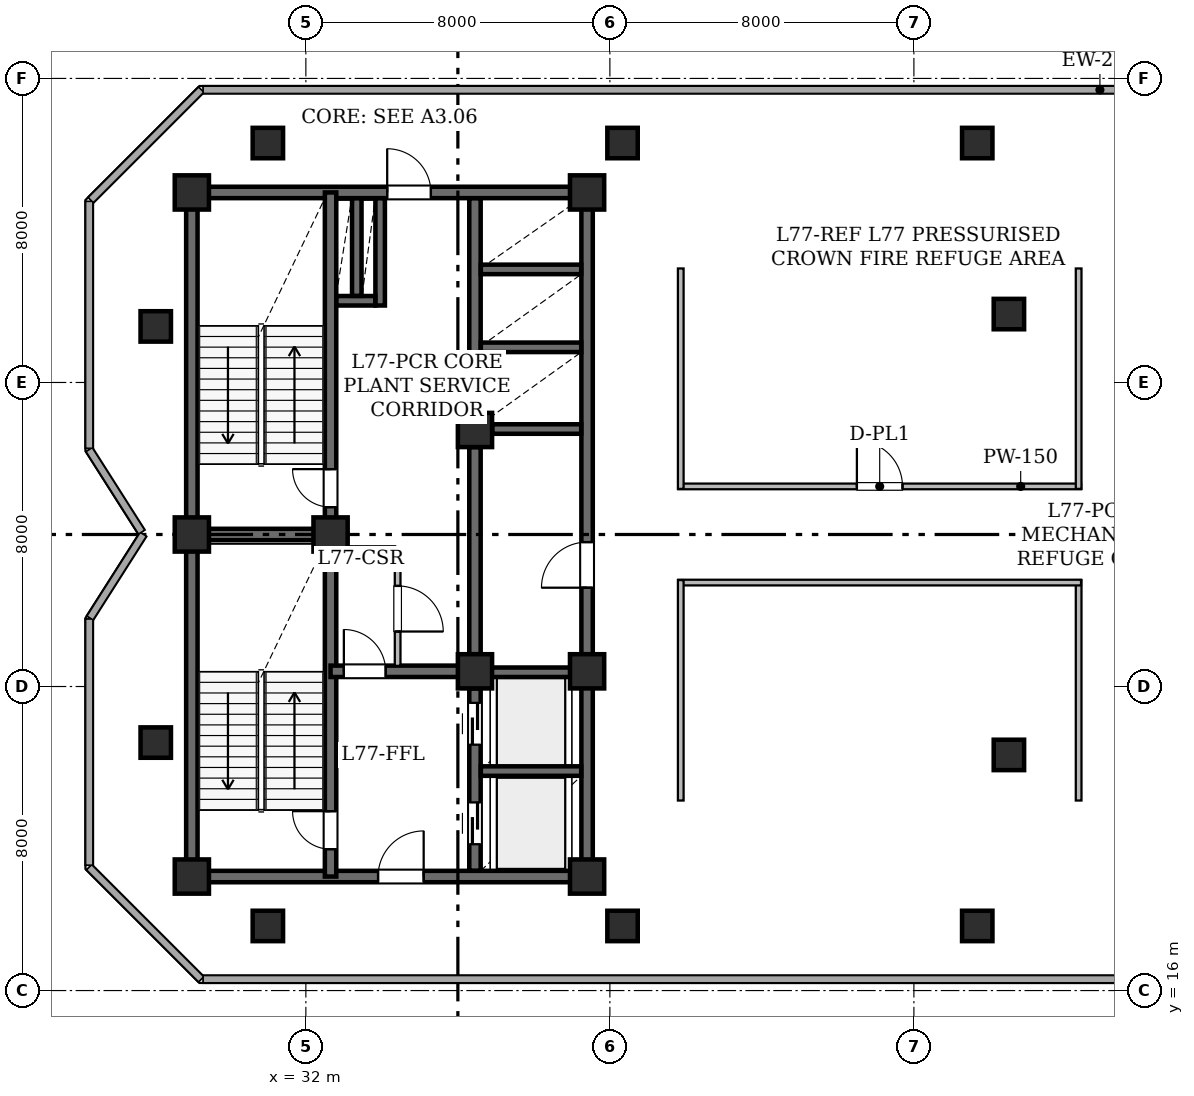
"""IFC4 building model, lengths in metres.
Left out: names, types, materials, properties, quantities, classifications, styles, units other than length and angle.
Written with IfcOpenShell. Run it as: python <this file> out.ifc"""

import sys

from ifc_helpers import new_model, si_unit, direction, frame, frame_2d, origin, origin_2d, place, context, subcontext, project, spatial, rectangle, hollow_rectangle, extrude, element, fill, save


model = new_model("IFC4")
c1 = context("Model", 3, precision=1e-05, world=origin(), true_north=direction((0.0, 1.0)))
c2 = subcontext(c1, "Body", "Model", "MODEL_VIEW")
j1 = project(units=[si_unit("LENGTHUNIT", "METRE"), si_unit("PLANEANGLEUNIT", "RADIAN")], contexts=[c1])
p1 = place(None, origin())
s1 = spatial("IfcSite", under=j1, at=p1, CompositionType="ELEMENT")
p2 = place(p1, origin())
s2 = spatial("IfcBuilding", under=s1, at=p2, CompositionType="ELEMENT")
p3 = place(p2, frame((0.0, 0.0, 303.05)))
s3 = spatial("IfcBuildingStorey", under=s2, at=p3, CompositionType="ELEMENT", Elevation=303.05)
for number, where, z_axis, x_axis in (
    (1, (29.0, 19.0, 0.0), (0.0, 0.0, 1.0), (1.0, 0.0, 0.0)),
    (2, (32.65, 28.0, 0.0), (0.0, 0.0, 1.0), (1.0, 0.0, 0.0)),
    (3, (39.4, 19.0, 0.0), (0.0, 0.0, 1.0), (1.0, 0.0, 0.0)),
    (4, (29.0, 28.0, 0.0), (0.0, 0.0, 1.0), (1.0, 0.0, 0.0)),
    (5, (36.45, 24.4, 0.0), (0.0, 0.0, 1.0), (1.0, 0.0, 0.0)),
    (6, (39.4, 24.4, 0.0), (0.0, 0.0, 1.0), (1.0, 0.0, 0.0)),
    (7, (29.0, 37.0, 0.0), (0.0, 0.0, 1.0), (1.0, 0.0, 0.0)),
    (8, (36.45, 30.75, 0.0), (0.0, 0.0, 1.0), (1.0, 0.0, 0.0)),
    (9, (39.4, 37.0, 0.0), (0.0, 0.0, 1.0), (1.0, 0.0, 0.0)),
):
    element("IfcColumn", number, at=place(p3, frame(where, z_axis=z_axis, x_axis=x_axis)), inside=s3, PredefinedType="COLUMN", context=c2, shape_type="SweptSolid", body=[
        extrude(hollow_rectangle(XDim=0.9, YDim=0.9, WallThickness=0.045, at=origin_2d()), origin(), (0.0, 0.0, 1.0), 4.8),
    ])
for number, where, z_axis, x_axis in (
    (10, (31.0, 17.7, 0.0), (0.0, 0.0, 1.0), (1.0, 0.0, 0.0)),
    (11, (40.333, 17.7, 0.0), (0.0, 0.0, 1.0), (1.0, 0.0, 0.0)),
    (12, (49.667, 17.7, 0.0), (0.0, 0.0, 1.0), (1.0, 0.0, 0.0)),
    (13, (31.0, 38.3, 0.0), (0.0, 0.0, 1.0), (1.0, 0.0, 0.0)),
    (14, (40.333, 38.3, 0.0), (0.0, 0.0, 1.0), (1.0, 0.0, 0.0)),
    (15, (49.667, 38.3, 0.0), (0.0, 0.0, 1.0), (1.0, 0.0, 0.0)),
    (16, (28.05, 22.525, 0.0), (0.0, 0.0, 1.0), (1.0, 0.0, 0.0)),
    (17, (28.05, 33.475, 0.0), (0.0, 0.0, 1.0), (1.0, 0.0, 0.0)),
    (18, (50.5, 22.2, 0.0), (0.0, 0.0, 1.0), (1.0, 0.0, 0.0)),
    (19, (50.5, 33.8, 0.0), (0.0, 0.0, 1.0), (1.0, 0.0, 0.0)),
):
    element("IfcColumn", number, at=place(p3, frame(where, z_axis=z_axis, x_axis=x_axis)), inside=s3, PredefinedType="COLUMN", context=c2, shape_type="SweptSolid", body=[
        extrude(hollow_rectangle(XDim=0.8, YDim=0.8, WallThickness=0.04, at=origin_2d()), origin(), (0.0, 0.0, 1.0), 4.8),
    ])
p4 = place(p3, frame((29.241, 16.3, 0.0), z_axis=(0.0, 0.0, 1.0), x_axis=(-0.707106781187, 0.707106781187, 0.0)))
e20 = element("IfcWall", 20, at=p4, inside=s3, PredefinedType="STANDARD", context=c2, shape_type="SweptSolid", body=[
    extrude(rectangle(XDim=4.159, YDim=0.2, at=frame_2d((2.08, 0.0))), origin(), (0.0, 0.0, 1.0), 1.15),
])
p5 = place(p3, frame((26.3, 19.304, 0.0), z_axis=(0.0, 0.0, 1.0), x_axis=(0.0, 1.0, 0.0)))
e21 = element("IfcWall", 21, at=p5, inside=s3, PredefinedType="STANDARD", context=c2, shape_type="SweptSolid", body=[
    extrude(rectangle(XDim=6.467, YDim=0.2, at=frame_2d((3.233, 0.0))), origin(), (0.0, 0.0, 1.0), 1.15),
])
p6 = place(p3, frame((26.323, 25.808, 0.0), z_axis=(0.0, 0.0, 1.0), x_axis=(0.53719156007, 0.843460270428, 0.0)))
e22 = element("IfcWall", 22, at=p6, inside=s3, PredefinedType="STANDARD", context=c2, shape_type="SweptSolid", body=[
    extrude(rectangle(XDim=2.599, YDim=0.2, at=frame_2d((1.299, 0.0))), origin(), (0.0, 0.0, 1.0), 1.15),
])
p7 = place(p3, frame((27.675, 28.068, 0.0), z_axis=(0.0, 0.0, 1.0), x_axis=(-0.536844652872, 0.843681111963, 0.0)))
e23 = element("IfcWall", 23, at=p7, inside=s3, PredefinedType="STANDARD", context=c2, shape_type="SweptSolid", body=[
    extrude(rectangle(XDim=2.561, YDim=0.2, at=frame_2d((1.281, 0.0))), origin(), (0.0, 0.0, 1.0), 1.15),
])
p8 = place(p3, frame((26.3, 30.274, 0.0), z_axis=(0.0, 0.0, 1.0), x_axis=(0.0, 1.0, 0.0)))
e24 = element("IfcWall", 24, at=p8, inside=s3, PredefinedType="STANDARD", context=c2, shape_type="SweptSolid", body=[
    extrude(rectangle(XDim=6.485, YDim=0.2, at=frame_2d((3.243, 0.0))), origin(), (0.0, 0.0, 1.0), 1.15),
])
p9 = place(p3, frame((26.344, 36.803, 0.0), z_axis=(0.0, 0.0, 1.0), x_axis=(0.707106781187, 0.707106781187, 0.0)))
e25 = element("IfcWall", 25, at=p9, inside=s3, PredefinedType="STANDARD", context=c2, shape_type="SweptSolid", body=[
    extrude(rectangle(XDim=4.097, YDim=0.2, at=frame_2d((2.048, 0.0))), origin(), (0.0, 0.0, 1.0), 1.15),
])
p10 = place(p3, frame((29.302, 39.7, 0.0), z_axis=(0.0, 0.0, 1.0), x_axis=(1.0, 0.0, 0.0)))
e26 = element("IfcWall", 26, at=p10, inside=s3, PredefinedType="STANDARD", context=c2, shape_type="SweptSolid", body=[
    extrude(rectangle(XDim=31.457, YDim=0.2, at=frame_2d((15.729, 0.0))), origin(), (0.0, 0.0, 1.0), 1.15),
])
p11 = place(p3, frame((60.696, 16.3, 0.0), z_axis=(0.0, 0.0, 1.0), x_axis=(-1.0, 0.0, 0.0)))
e27 = element("IfcWall", 27, at=p11, inside=s3, PredefinedType="STANDARD", context=c2, shape_type="SweptSolid", body=[
    extrude(rectangle(XDim=31.393, YDim=0.2, at=frame_2d((15.697, 0.0))), origin(), (0.0, 0.0, 1.0), 1.15),
])
for number, where, z_axis, x_axis in (
    (28, (29.0, 19.0, 0.0), (0.0, 0.0, 1.0), (0.0, 1.0, 0.0)),
    (29, (29.0, 28.0, 0.0), (0.0, 0.0, 1.0), (0.0, 1.0, 0.0)),
):
    element("IfcWall", number, at=place(p3, frame(where, z_axis=z_axis, x_axis=x_axis)), inside=s3, PredefinedType="SHEAR", context=c2, shape_type="SweptSolid", body=[
        extrude(rectangle(XDim=9.0, YDim=0.3, at=frame_2d((4.5, 0.0))), origin(), (0.0, 0.0, 1.0), 4.55),
    ])
p12 = place(p3, frame((29.0, 19.0, 0.0), z_axis=(0.0, 0.0, 1.0), x_axis=(1.0, 0.0, 0.0)))
e30 = element("IfcWall", 30, at=p12, inside=s3, PredefinedType="SHEAR", context=c2, shape_type="SweptSolid", body=[
    extrude(rectangle(XDim=10.4, YDim=0.3, at=frame_2d((5.2, 0.0))), origin(), (0.0, 0.0, 1.0), 4.55),
])
p13 = place(p12, frame((4.9, 0.0, 0.0)))
e31 = element("IfcOpeningElement", 31, at=p13, cuts=e30, PredefinedType="OPENING", context=c2, shape_type="SweptSolid", body=[
    extrude(rectangle(XDim=1.2, YDim=2.15, at=frame_2d((0.6, 1.075))), frame((0.0, 0.16, 0.0), z_axis=(0.0, -1.0, 0.0), x_axis=(1.0, 0.0, 0.0)), (0.0, 0.0, 1.0), 0.32),
])
p14 = place(p3, frame((29.0, 37.0, 0.0), z_axis=(0.0, 0.0, 1.0), x_axis=(1.0, 0.0, 0.0)))
e32 = element("IfcWall", 32, at=p14, inside=s3, PredefinedType="SHEAR", context=c2, shape_type="SweptSolid", body=[
    extrude(rectangle(XDim=10.4, YDim=0.3, at=frame_2d((5.2, 0.0))), origin(), (0.0, 0.0, 1.0), 4.55),
])
p15 = place(p14, frame((5.14, 0.0, 0.0)))
e33 = element("IfcOpeningElement", 33, at=p15, cuts=e32, PredefinedType="OPENING", context=c2, shape_type="SweptSolid", body=[
    extrude(rectangle(XDim=1.15, YDim=2.2, at=frame_2d((0.575, 1.1))), frame((0.0, 0.16, 0.0), z_axis=(0.0, -1.0, 0.0), x_axis=(1.0, 0.0, 0.0)), (0.0, 0.0, 1.0), 0.32),
])
p16 = place(p3, frame((39.4, 19.0, 0.0), z_axis=(0.0, 0.0, 1.0), x_axis=(0.0, 1.0, 0.0)))
e34 = element("IfcWall", 34, at=p16, inside=s3, PredefinedType="SHEAR", context=c2, shape_type="SweptSolid", body=[
    extrude(rectangle(XDim=5.4, YDim=0.3, at=frame_2d((2.7, 0.0))), origin(), (0.0, 0.0, 1.0), 4.55),
])
p17 = place(p3, frame((39.4, 24.4, 0.0), z_axis=(0.0, 0.0, 1.0), x_axis=(0.0, 1.0, 0.0)))
e35 = element("IfcWall", 35, at=p17, inside=s3, PredefinedType="SHEAR", context=c2, shape_type="SweptSolid", body=[
    extrude(rectangle(XDim=12.6, YDim=0.3, at=frame_2d((6.3, 0.0))), origin(), (0.0, 0.0, 1.0), 4.55),
])
p18 = place(p17, frame((2.2, 0.0, 0.0)))
e36 = element("IfcOpeningElement", 36, at=p18, cuts=e35, PredefinedType="OPENING", context=c2, shape_type="SweptSolid", body=[
    extrude(rectangle(XDim=1.2, YDim=2.15, at=frame_2d((0.6, 1.075))), frame((0.0, 0.16, 0.0), z_axis=(0.0, -1.0, 0.0), x_axis=(1.0, 0.0, 0.0)), (0.0, 0.0, 1.0), 0.32),
])
p19 = place(p3, frame((32.65, 19.0, 0.0), z_axis=(0.0, 0.0, 1.0), x_axis=(0.0, 1.0, 0.0)))
e37 = element("IfcWall", 37, at=p19, inside=s3, PredefinedType="SHEAR", context=c2, shape_type="SweptSolid", body=[
    extrude(rectangle(XDim=9.0, YDim=0.3, at=frame_2d((4.5, 0.0))), origin(), (0.0, 0.0, 1.0), 4.55),
])
p20 = place(p19, frame((0.72, 0.0, 0.0)))
e38 = element("IfcOpeningElement", 38, at=p20, cuts=e37, PredefinedType="OPENING", context=c2, shape_type="SweptSolid", body=[
    extrude(rectangle(XDim=1.0, YDim=2.15, at=frame_2d((0.5, 1.075))), frame((0.0, 0.16, 0.0), z_axis=(0.0, -1.0, 0.0), x_axis=(1.0, 0.0, 0.0)), (0.0, 0.0, 1.0), 0.32),
])
p21 = place(p3, frame((32.65, 28.0, 0.0), z_axis=(0.0, 0.0, 1.0), x_axis=(0.0, 1.0, 0.0)))
e39 = element("IfcWall", 39, at=p21, inside=s3, PredefinedType="SHEAR", context=c2, shape_type="SweptSolid", body=[
    extrude(rectangle(XDim=9.0, YDim=0.3, at=frame_2d((4.5, 0.0))), origin(), (0.0, 0.0, 1.0), 4.55),
])
p22 = place(p21, frame((0.72, 0.0, 0.0)))
e40 = element("IfcOpeningElement", 40, at=p22, cuts=e39, PredefinedType="OPENING", context=c2, shape_type="SweptSolid", body=[
    extrude(rectangle(XDim=1.0, YDim=2.15, at=frame_2d((0.5, 1.075))), frame((0.0, 0.16, 0.0), z_axis=(0.0, -1.0, 0.0), x_axis=(1.0, 0.0, 0.0)), (0.0, 0.0, 1.0), 0.32),
])
p23 = place(p3, frame((29.0, 28.0, 0.0), z_axis=(0.0, 0.0, 1.0), x_axis=(1.0, 0.0, 0.0)))
e41 = element("IfcWall", 41, at=p23, inside=s3, PredefinedType="SHEAR", context=c2, shape_type="SweptSolid", body=[
    extrude(rectangle(XDim=3.65, YDim=0.3, at=frame_2d((1.825, 0.0))), origin(), (0.0, 0.0, 1.0), 4.55),
])
p24 = place(p3, frame((32.65, 24.4, 0.0), z_axis=(0.0, 0.0, 1.0), x_axis=(1.0, 0.0, 0.0)))
e42 = element("IfcWall", 42, at=p24, inside=s3, PredefinedType="SHEAR", context=c2, shape_type="SweptSolid", body=[
    extrude(rectangle(XDim=3.8, YDim=0.3, at=frame_2d((1.9, 0.0))), origin(), (0.0, 0.0, 1.0), 4.55),
])
p25 = place(p24, frame((0.35, 0.0, 0.0)))
e43 = element("IfcOpeningElement", 43, at=p25, cuts=e42, PredefinedType="OPENING", context=c2, shape_type="SweptSolid", body=[
    extrude(rectangle(XDim=1.1, YDim=2.15, at=frame_2d((0.55, 1.075))), frame((0.0, 0.16, 0.0), z_axis=(0.0, -1.0, 0.0), x_axis=(1.0, 0.0, 0.0)), (0.0, 0.0, 1.0), 0.32),
])
p26 = place(p3, frame((36.45, 19.154, 0.0), z_axis=(0.0, 0.0, 1.0), x_axis=(0.0, 1.0, 0.0)))
e44 = element("IfcWall", 44, at=p26, inside=s3, PredefinedType="SHEAR", context=c2, shape_type="SweptSolid", body=[
    extrude(rectangle(XDim=4.796, YDim=0.3, at=frame_2d((2.398, 0.0))), origin(), (0.0, 0.0, 1.0), 4.55),
])
p27 = place(p26, frame((0.696, 0.0, 0.0)))
e45 = element("IfcOpeningElement", 45, at=p27, cuts=e44, PredefinedType="OPENING", context=c2, shape_type="SweptSolid", body=[
    extrude(rectangle(XDim=1.1, YDim=2.15, at=frame_2d((0.55, 1.075))), frame((0.0, 0.16, 0.0), z_axis=(0.0, -1.0, 0.0), x_axis=(1.0, 0.0, 0.0)), (0.0, 0.0, 1.0), 0.32),
])
p28 = place(p26, frame((3.316, 0.0, 0.0)))
e46 = element("IfcOpeningElement", 46, at=p28, cuts=e44, PredefinedType="OPENING", context=c2, shape_type="SweptSolid", body=[
    extrude(rectangle(XDim=1.1, YDim=2.15, at=frame_2d((0.55, 1.075))), frame((0.0, 0.16, 0.0), z_axis=(0.0, -1.0, 0.0), x_axis=(1.0, 0.0, 0.0)), (0.0, 0.0, 1.0), 0.32),
])
p29 = place(p3, frame((36.45, 24.85, 0.0), z_axis=(0.0, 0.0, 1.0), x_axis=(0.0, 1.0, 0.0)))
e47 = element("IfcWall", 47, at=p29, inside=s3, PredefinedType="SHEAR", context=c2, shape_type="SweptSolid", body=[
    extrude(rectangle(XDim=5.45, YDim=0.3, at=frame_2d((2.725, 0.0))), origin(), (0.0, 0.0, 1.0), 4.55),
])
p30 = place(p3, frame((36.45, 31.2, 0.0), z_axis=(0.0, 0.0, 1.0), x_axis=(0.0, 1.0, 0.0)))
e48 = element("IfcWall", 48, at=p30, inside=s3, PredefinedType="SHEAR", context=c2, shape_type="SweptSolid", body=[
    extrude(rectangle(XDim=5.646, YDim=0.3, at=frame_2d((2.823, 0.0))), origin(), (0.0, 0.0, 1.0), 4.55),
])
for number, where, z_axis, x_axis in (
    (49, (36.604, 21.775, 0.0), (0.0, 0.0, 1.0), (1.0, 0.0, 0.0)),
    (50, (36.604, 24.375, 0.0), (0.0, 0.0, 1.0), (1.0, 0.0, 0.0)),
):
    element("IfcWall", number, at=place(p3, frame(where, z_axis=z_axis, x_axis=x_axis)), inside=s3, PredefinedType="SHEAR", context=c2, shape_type="SweptSolid", body=[
        extrude(rectangle(XDim=2.642, YDim=0.25, at=frame_2d((1.321, 0.0))), origin(), (0.0, 0.0, 1.0), 4.55),
    ])
p31 = place(p3, frame((36.904, 30.775, 0.0), z_axis=(0.0, 0.0, 1.0), x_axis=(1.0, 0.0, 0.0)))
e51 = element("IfcWall", 51, at=p31, inside=s3, PredefinedType="SHEAR", context=c2, shape_type="SweptSolid", body=[
    extrude(rectangle(XDim=2.342, YDim=0.25, at=frame_2d((1.171, 0.0))), origin(), (0.0, 0.0, 1.0), 4.55),
])
for number, where, z_axis, x_axis in (
    (52, (36.604, 32.925, 0.0), (0.0, 0.0, 1.0), (1.0, 0.0, 0.0)),
    (53, (36.604, 34.975, 0.0), (0.0, 0.0, 1.0), (1.0, 0.0, 0.0)),
):
    element("IfcWall", number, at=place(p3, frame(where, z_axis=z_axis, x_axis=x_axis)), inside=s3, PredefinedType="SHEAR", context=c2, shape_type="SweptSolid", body=[
        extrude(rectangle(XDim=2.642, YDim=0.25, at=frame_2d((1.321, 0.0))), origin(), (0.0, 0.0, 1.0), 4.55),
    ])
p32 = place(p3, frame((33.955, 34.025, 0.0), z_axis=(0.0, 0.0, 1.0), x_axis=(0.0, 1.0, 0.0)))
e54 = element("IfcWall", 54, at=p32, inside=s3, PredefinedType="SHEAR", context=c2, shape_type="SweptSolid", body=[
    extrude(rectangle(XDim=2.821, YDim=0.25, at=frame_2d((1.411, 0.0))), origin(), (0.0, 0.0, 1.0), 4.55),
])
p33 = place(p3, frame((32.804, 34.15, 0.0), z_axis=(0.0, 0.0, 1.0), x_axis=(1.0, 0.0, 0.0)))
e55 = element("IfcWall", 55, at=p33, inside=s3, PredefinedType="SHEAR", context=c2, shape_type="SweptSolid", body=[
    extrude(rectangle(XDim=1.022, YDim=0.25, at=frame_2d((0.511, 0.0))), origin(), (0.0, 0.0, 1.0), 4.55),
])
p34 = place(p3, frame((33.34, 34.279, 0.0), z_axis=(0.0, 0.0, 1.0), x_axis=(0.0, 1.0, 0.0)))
e56 = element("IfcWall", 56, at=p34, inside=s3, PredefinedType="SHEAR", context=c2, shape_type="SweptSolid", body=[
    extrude(rectangle(XDim=2.567, YDim=0.25, at=frame_2d((1.283, 0.0))), origin(), (0.0, 0.0, 1.0), 4.55),
])
p35 = place(p3, frame((32.794, 27.615, 0.0), z_axis=(0.0, 0.0, 1.0), x_axis=(1.0, 0.0, 0.0)))
e57 = element("IfcWall", 57, at=p35, inside=s3, PredefinedType="STANDARD", context=c2, shape_type="SweptSolid", body=[
    extrude(rectangle(XDim=1.556, YDim=0.15, at=frame_2d((0.778, 0.0))), origin(), (0.0, 0.0, 1.0), 4.007),
])
p36 = place(p3, frame((34.415, 27.55, 0.0), z_axis=(0.0, 0.0, 1.0), x_axis=(0.0, -1.0, 0.0)))
e58 = element("IfcWall", 58, at=p36, inside=s3, PredefinedType="STANDARD", context=c2, shape_type="SweptSolid", body=[
    extrude(rectangle(XDim=3.006, YDim=0.15, at=frame_2d((1.503, 0.0))), origin(), (0.0, 0.0, 1.0), 4.55),
])
p37 = place(p36, frame((0.903, 0.0, 0.0)))
e59 = element("IfcOpeningElement", 59, at=p37, cuts=e58, PredefinedType="OPENING", context=c2, shape_type="SweptSolid", body=[
    extrude(rectangle(XDim=1.2, YDim=2.15, at=frame_2d((0.6, 1.075))), frame((0.0, 0.085, 0.0), z_axis=(0.0, -1.0, 0.0), x_axis=(1.0, 0.0, 0.0)), (0.0, 0.0, 1.0), 0.17),
])
p38 = place(p3, frame((41.8, 29.265, 0.0), z_axis=(0.0, 0.0, 1.0), x_axis=(1.0, 0.0, 0.0)))
e60 = element("IfcWall", 60, at=p38, inside=s3, PredefinedType="STANDARD", context=c2, shape_type="SweptSolid", body=[
    extrude(rectangle(XDim=10.6, YDim=0.15, at=frame_2d((5.3, 0.0))), origin(), (0.0, 0.0, 1.0), 3.845),
])
p39 = place(p38, frame((4.7, 0.0, 0.0)))
e61 = element("IfcOpeningElement", 61, at=p39, cuts=e60, PredefinedType="OPENING", context=c2, shape_type="SweptSolid", body=[
    extrude(rectangle(XDim=1.2, YDim=2.15, at=frame_2d((0.6, 1.075))), frame((0.0, 0.085, 0.0), z_axis=(0.0, -1.0, 0.0), x_axis=(1.0, 0.0, 0.0)), (0.0, 0.0, 1.0), 0.17),
])
for number, where, z_axis, x_axis in (
    (62, (52.335, 29.2, 0.0), (0.0, 0.0, 1.0), (0.0, 1.0, 0.0)),
    (63, (52.335, 21.0, 0.0), (0.0, 0.0, 1.0), (0.0, 1.0, 0.0)),
):
    element("IfcWall", number, at=place(p3, frame(where, z_axis=z_axis, x_axis=x_axis)), inside=s3, PredefinedType="STANDARD", context=c2, shape_type="SweptSolid", body=[
        extrude(rectangle(XDim=5.8, YDim=0.15, at=frame_2d((2.9, 0.0))), origin(), (0.0, 0.0, 1.0), 3.845),
    ])
p40 = place(p3, frame((52.398, 26.735, 0.0), z_axis=(0.0, 0.0, 1.0), x_axis=(-1.0, 0.0, 0.0)))
e64 = element("IfcWall", 64, at=p40, inside=s3, PredefinedType="STANDARD", context=c2, shape_type="SweptSolid", body=[
    extrude(rectangle(XDim=10.598, YDim=0.15, at=frame_2d((5.299, 0.0))), origin(), (0.0, 0.0, 1.0), 3.845),
])
p41 = place(p3, frame((41.865, 26.8, 0.0), z_axis=(0.0, 0.0, 1.0), x_axis=(0.0, -1.0, 0.0)))
e65 = element("IfcWall", 65, at=p41, inside=s3, PredefinedType="STANDARD", context=c2, shape_type="SweptSolid", body=[
    extrude(rectangle(XDim=5.8, YDim=0.15, at=frame_2d((2.9, 0.0))), origin(), (0.0, 0.0, 1.0), 3.845),
])
p42 = place(p3, frame((41.865, 35.0, 0.0), z_axis=(0.0, 0.0, 1.0), x_axis=(0.0, -1.0, 0.0)))
e66 = element("IfcWall", 66, at=p42, inside=s3, PredefinedType="STANDARD", context=c2, shape_type="SweptSolid", body=[
    extrude(rectangle(XDim=5.8, YDim=0.15, at=frame_2d((2.9, 0.0))), origin(), (0.0, 0.0, 1.0), 4.55),
])
p43 = place(p20, origin())
e67 = element("IfcDoor", 67, at=p43, inside=s3, OperationType="SINGLE_SWING_RIGHT", PredefinedType="DOOR", context=c2, shape_type="SweptSolid", body=[
    extrude(rectangle(XDim=1.0, YDim=2.15, at=frame_2d((0.5, 1.075))), frame((0.0, 0.025, 0.0), z_axis=(0.0, -1.0, 0.0), x_axis=(1.0, 0.0, 0.0)), (0.0, 0.0, 1.0), 0.05),
])
fill(e38, e67)
p44 = place(p22, origin())
e68 = element("IfcDoor", 68, at=p44, inside=s3, OperationType="SINGLE_SWING_RIGHT", PredefinedType="DOOR", context=c2, shape_type="SweptSolid", body=[
    extrude(rectangle(XDim=1.0, YDim=2.15, at=frame_2d((0.5, 1.075))), frame((0.0, 0.025, 0.0), z_axis=(0.0, -1.0, 0.0), x_axis=(1.0, 0.0, 0.0)), (0.0, 0.0, 1.0), 0.05),
])
fill(e40, e68)
p45 = place(p25, origin())
e69 = element("IfcDoor", 69, at=p45, inside=s3, OperationType="SINGLE_SWING_LEFT", PredefinedType="DOOR", context=c2, shape_type="SweptSolid", body=[
    extrude(rectangle(XDim=1.1, YDim=2.15, at=frame_2d((0.55, 1.075))), frame((0.0, 0.025, 0.0), z_axis=(0.0, -1.0, 0.0), x_axis=(1.0, 0.0, 0.0)), (0.0, 0.0, 1.0), 0.05),
])
fill(e43, e69)
p46 = place(p13, origin())
e70 = element("IfcDoor", 70, at=p46, inside=s3, OperationType="SINGLE_SWING_RIGHT", PredefinedType="DOOR", context=c2, shape_type="SweptSolid", body=[
    extrude(rectangle(XDim=1.2, YDim=2.15, at=frame_2d((0.6, 1.075))), frame((0.0, 0.025, 0.0), z_axis=(0.0, -1.0, 0.0), x_axis=(1.0, 0.0, 0.0)), (0.0, 0.0, 1.0), 0.05),
])
fill(e31, e70)
p47 = place(p15, origin())
e71 = element("IfcDoor", 71, at=p47, inside=s3, OperationType="SINGLE_SWING_LEFT", PredefinedType="DOOR", context=c2, shape_type="SweptSolid", body=[
    extrude(rectangle(XDim=1.15, YDim=2.2, at=frame_2d((0.575, 1.1))), frame((0.0, 0.025, 0.0), z_axis=(0.0, -1.0, 0.0), x_axis=(1.0, 0.0, 0.0)), (0.0, 0.0, 1.0), 0.05),
])
fill(e33, e71)
p48 = place(p18, origin())
e72 = element("IfcDoor", 72, at=p48, inside=s3, OperationType="SINGLE_SWING_LEFT", PredefinedType="DOOR", context=c2, shape_type="SweptSolid", body=[
    extrude(rectangle(XDim=1.2, YDim=2.15, at=frame_2d((0.6, 1.075))), frame((0.0, 0.025, 0.0), z_axis=(0.0, -1.0, 0.0), x_axis=(1.0, 0.0, 0.0)), (0.0, 0.0, 1.0), 0.05),
])
fill(e36, e72)
p49 = place(p27, origin())
e73 = element("IfcDoor", 73, at=p49, inside=s3, OperationType="SLIDING_TO_LEFT", PredefinedType="DOOR", context=c2, shape_type="SweptSolid", body=[
    extrude(rectangle(XDim=1.1, YDim=2.15, at=frame_2d((0.55, 1.075))), frame((0.0, 0.025, 0.0), z_axis=(0.0, -1.0, 0.0), x_axis=(1.0, 0.0, 0.0)), (0.0, 0.0, 1.0), 0.05),
])
fill(e45, e73)
p50 = place(p28, origin())
e74 = element("IfcDoor", 74, at=p50, inside=s3, OperationType="SLIDING_TO_LEFT", PredefinedType="DOOR", context=c2, shape_type="SweptSolid", body=[
    extrude(rectangle(XDim=1.1, YDim=2.15, at=frame_2d((0.55, 1.075))), frame((0.0, 0.025, 0.0), z_axis=(0.0, -1.0, 0.0), x_axis=(1.0, 0.0, 0.0)), (0.0, 0.0, 1.0), 0.05),
])
fill(e46, e74)
p51 = place(p37, origin())
e75 = element("IfcDoor", 75, at=p51, inside=s3, OperationType="SINGLE_SWING_RIGHT", PredefinedType="DOOR", context=c2, shape_type="SweptSolid", body=[
    extrude(rectangle(XDim=1.2, YDim=2.15, at=frame_2d((0.6, 1.075))), frame((0.0, 0.025, 0.0), z_axis=(0.0, -1.0, 0.0), x_axis=(1.0, 0.0, 0.0)), (0.0, 0.0, 1.0), 0.05),
])
fill(e59, e75)
p52 = place(p39, origin())
e76 = element("IfcDoor", 76, at=p52, inside=s3, OperationType="SINGLE_SWING_LEFT", PredefinedType="DOOR", context=c2, shape_type="SweptSolid", body=[
    extrude(rectangle(XDim=1.2, YDim=2.15, at=frame_2d((0.6, 1.075))), frame((0.0, 0.025, 0.0), z_axis=(0.0, -1.0, 0.0), x_axis=(1.0, 0.0, 0.0)), (0.0, 0.0, 1.0), 0.05),
])
fill(e61, e76)
save(model, sys.argv[1])
